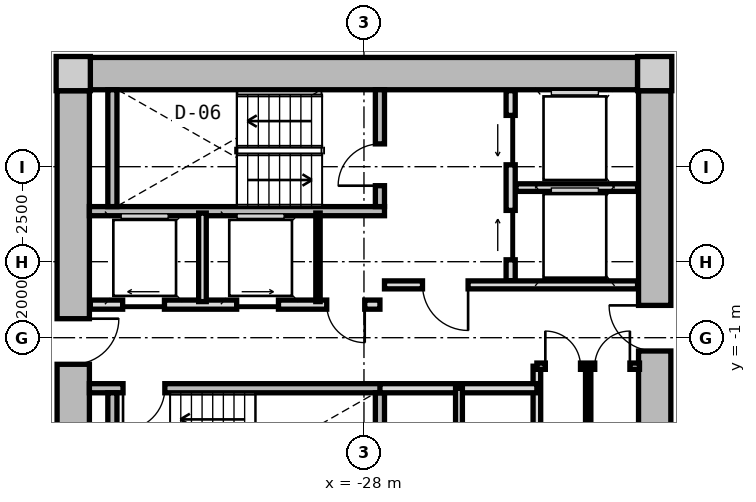
"""IFC4 building model, lengths in metres.
Left out: names, types, materials, properties, quantities, classifications, styles, units other than length and angle.
Written with IfcOpenShell. Run it as: python <this file> out.ifc"""

import sys

from ifc_helpers import new_model, si_unit, direction, frame, frame_2d, origin, origin_2d, place, context, subcontext, project, spatial, rectangle, extrude, source, transform, mapped, element, fill, save


model = new_model("IFC4")
c1 = context("Model", 3, precision=1e-05, world=origin(), true_north=direction((0.0, 1.0)))
c2 = subcontext(c1, "Body", "Model", "MODEL_VIEW")
j1 = project(units=[si_unit("LENGTHUNIT", "METRE"), si_unit("PLANEANGLEUNIT", "RADIAN")], contexts=[c1])
p1 = place(None, origin())
s1 = spatial("IfcSite", under=j1, at=p1, CompositionType="ELEMENT")
p2 = place(p1, origin())
s2 = spatial("IfcBuilding", under=s1, at=p2, CompositionType="ELEMENT")
p3 = place(p2, frame((0.0, 0.0, 30.75)))
s3 = spatial("IfcBuildingStorey", under=s2, at=p3, CompositionType="ELEMENT", Elevation=30.75)
m1 = source(origin(), c2, "Body", "SweptSolid", [
    extrude(rectangle(XDim=0.9, YDim=0.9, at=origin_2d()), origin(), (0.0, 0.0, 1.0), 3.05),
])
for number, where, z_axis, x_axis in (
    (1, (-20.35, 5.95, 0.0), (0.0, 0.0, 1.0), (1.0, 0.0, 0.0)),
    (2, (-35.65, 5.95, 0.0), (0.0, 0.0, 1.0), (1.0, 0.0, 0.0)),
):
    element("IfcColumn", number, at=place(p3, frame(where, z_axis=z_axis, x_axis=x_axis)), inside=s3, PredefinedType="COLUMN", context=c2, shape_type="MappedRepresentation", body=[
        mapped(m1, transform((0.0, 0.0, 0.0), x_axis=(1.0, 0.0, 0.0), y_axis=(0.0, 1.0, 0.0), z_axis=(0.0, 0.0, 1.0), scale=1.0)),
    ])
m2 = source(origin(), c2, "Body", "SweptSolid", [
    extrude(rectangle(XDim=14.4, YDim=0.85, at=frame_2d((7.2, 0.0))), origin(), (0.0, 0.0, 1.0), 2.79),
])
p4 = place(p3, frame((-35.2, 5.95, 0.0), z_axis=(0.0, 0.0, 1.0), x_axis=(1.0, 0.0, 0.0)))
e3 = element("IfcWall", 3, at=p4, inside=s3, PredefinedType="SHEAR", context=c2, shape_type="MappedRepresentation", body=[
    mapped(m2, transform((0.0, 0.0, 0.0), x_axis=(1.0, 0.0, 0.0), y_axis=(0.0, 1.0, 0.0), z_axis=(0.0, 0.0, 1.0), scale=1.0)),
])
m3 = source(origin(), c2, "Body", "SweptSolid", [
    extrude(rectangle(XDim=11.0, YDim=0.85, at=frame_2d((5.5, 0.0))), origin(), (0.0, 0.0, 1.0), 2.79),
])
p5 = place(p3, frame((-35.65, -5.5, 0.0), z_axis=(0.0, 0.0, 1.0), x_axis=(0.0, 1.0, 0.0)))
e4 = element("IfcWall", 4, at=p5, inside=s3, PredefinedType="SHEAR", context=c2, shape_type="MappedRepresentation", body=[
    mapped(m3, transform((0.0, 0.0, 0.0), x_axis=(1.0, 0.0, 0.0), y_axis=(0.0, 1.0, 0.0), z_axis=(0.0, 0.0, 1.0), scale=1.0)),
])
p6 = place(p5, frame((3.8, 0.0, 0.0)))
e5 = element("IfcOpeningElement", 5, at=p6, cuts=e4, PredefinedType="OPENING", context=c2, shape_type="SweptSolid", body=[
    extrude(rectangle(XDim=1.2, YDim=2.15, at=frame_2d((0.6, 1.075))), frame((0.0, 0.435, 0.0), z_axis=(0.0, -1.0, 0.0), x_axis=(1.0, 0.0, 0.0)), (0.0, 0.0, 1.0), 0.87),
])
p7 = place(p3, frame((-20.35, 5.5, 0.0), z_axis=(0.0, 0.0, 1.0), x_axis=(0.0, -1.0, 0.0)))
e6 = element("IfcWall", 6, at=p7, inside=s3, PredefinedType="SHEAR", context=c2, shape_type="MappedRepresentation", body=[
    mapped(m3, transform((0.0, 0.0, 0.0), x_axis=(1.0, 0.0, 0.0), y_axis=(0.0, 1.0, 0.0), z_axis=(0.0, 0.0, 1.0), scale=1.0)),
])
p8 = place(p7, frame((5.65, 0.0, 0.0)))
e7 = element("IfcOpeningElement", 7, at=p8, cuts=e6, PredefinedType="OPENING", context=c2, shape_type="SweptSolid", body=[
    extrude(rectangle(XDim=1.2, YDim=2.15, at=frame_2d((0.6, 1.075))), frame((0.0, 0.435, 0.0), z_axis=(0.0, -1.0, 0.0), x_axis=(1.0, 0.0, 0.0)), (0.0, 0.0, 1.0), 0.87),
])
m4 = source(origin(), c2, "Body", "SweptSolid", [
    extrude(rectangle(XDim=7.765, YDim=0.24, at=frame_2d((3.883, 0.0))), origin(), (0.0, 0.0, 1.0), 2.79),
])
p9 = place(p3, frame((-35.225, 2.33, 0.0), z_axis=(0.0, 0.0, 1.0), x_axis=(1.0, 0.0, 0.0)))
e8 = element("IfcWall", 8, at=p9, inside=s3, PredefinedType="PARTITIONING", context=c2, shape_type="MappedRepresentation", body=[
    mapped(m4, transform((0.0, 0.0, 0.0), x_axis=(1.0, 0.0, 0.0), y_axis=(0.0, 1.0, 0.0), z_axis=(0.0, 0.0, 1.0), scale=1.0)),
])
m5 = source(origin(), c2, "Body", "SweptSolid", [
    extrude(rectangle(XDim=3.075, YDim=0.24, at=frame_2d((1.538, 0.0))), origin(), (0.0, 0.0, 1.0), 2.79),
])
p10 = place(p3, frame((-34.62, 2.45, 0.0), z_axis=(0.0, 0.0, 1.0), x_axis=(0.0, 1.0, 0.0)))
e9 = element("IfcWall", 9, at=p10, inside=s3, PredefinedType="PARTITIONING", context=c2, shape_type="MappedRepresentation", body=[
    mapped(m5, transform((0.0, 0.0, 0.0), x_axis=(1.0, 0.0, 0.0), y_axis=(0.0, 1.0, 0.0), z_axis=(0.0, 0.0, 1.0), scale=1.0)),
])
p11 = place(p3, frame((-27.58, 2.45, 0.0), z_axis=(0.0, 0.0, 1.0), x_axis=(0.0, 1.0, 0.0)))
e10 = element("IfcWall", 10, at=p11, inside=s3, PredefinedType="PARTITIONING", context=c2, shape_type="MappedRepresentation", body=[
    mapped(m5, transform((0.0, 0.0, 0.0), x_axis=(1.0, 0.0, 0.0), y_axis=(0.0, 1.0, 0.0), z_axis=(0.0, 0.0, 1.0), scale=1.0)),
])
p12 = place(p11, frame((0.55, 0.0, 0.0)))
e11 = element("IfcOpeningElement", 11, at=p12, cuts=e10, PredefinedType="OPENING", context=c2, shape_type="SweptSolid", body=[
    extrude(rectangle(XDim=1.1, YDim=2.15, at=frame_2d((0.55, 1.075))), frame((0.0, 0.13, 0.0), z_axis=(0.0, -1.0, 0.0), x_axis=(1.0, 0.0, 0.0)), (0.0, 0.0, 1.0), 0.26),
])
p13 = place(p3, frame((-35.225, -2.33, 0.0), z_axis=(0.0, 0.0, 1.0), x_axis=(1.0, 0.0, 0.0)))
e12 = element("IfcWall", 12, at=p13, inside=s3, PredefinedType="PARTITIONING", context=c2, shape_type="MappedRepresentation", body=[
    mapped(m4, transform((0.0, 0.0, 0.0), x_axis=(1.0, 0.0, 0.0), y_axis=(0.0, 1.0, 0.0), z_axis=(0.0, 0.0, 1.0), scale=1.0)),
])
p14 = place(p13, frame((0.885, 0.0, 0.0)))
e13 = element("IfcOpeningElement", 13, at=p14, cuts=e12, PredefinedType="OPENING", context=c2, shape_type="SweptSolid", body=[
    extrude(rectangle(XDim=1.1, YDim=2.15, at=frame_2d((0.55, 1.075))), frame((0.0, 0.13, 0.0), z_axis=(0.0, -1.0, 0.0), x_axis=(1.0, 0.0, 0.0)), (0.0, 0.0, 1.0), 0.26),
])
for number, where, z_axis, x_axis in (
    (14, (-34.62, -5.525, 0.0), (0.0, 0.0, 1.0), (0.0, 1.0, 0.0)),
    (15, (-27.58, -5.525, 0.0), (0.0, 0.0, 1.0), (0.0, 1.0, 0.0)),
):
    element("IfcWall", number, at=place(p3, frame(where, z_axis=z_axis, x_axis=x_axis)), inside=s3, PredefinedType="PARTITIONING", context=c2, shape_type="MappedRepresentation", body=[
        mapped(m5, transform((0.0, 0.0, 0.0), x_axis=(1.0, 0.0, 0.0), y_axis=(0.0, 1.0, 0.0), z_axis=(0.0, 0.0, 1.0), scale=1.0)),
    ])
m6 = source(origin(), c2, "Body", "SweptSolid", [
    extrude(rectangle(XDim=5.0, YDim=0.24, at=frame_2d((2.5, 0.0))), origin(), (0.0, 0.0, 1.0), 2.775),
])
p15 = place(p3, frame((-24.14, 0.5, 0.0), z_axis=(0.0, 0.0, 1.0), x_axis=(0.0, 1.0, 0.0)))
e16 = element("IfcWall", 16, at=p15, inside=s3, PredefinedType="PARTITIONING", context=c2, shape_type="MappedRepresentation", body=[
    mapped(m6, transform((0.0, 0.0, 0.0), x_axis=(1.0, 0.0, 0.0), y_axis=(0.0, 1.0, 0.0), z_axis=(0.0, 0.0, 1.0), scale=1.0)),
])
p16 = place(p15, frame((3.05, 0.0, 0.0)))
e17 = element("IfcOpeningElement", 17, at=p16, cuts=e16, PredefinedType="OPENING", context=c2, shape_type="SweptSolid", body=[
    extrude(rectangle(XDim=1.3, YDim=2.2, at=frame_2d((0.65, 1.1))), frame((0.0, 0.13, 0.0), z_axis=(0.0, -1.0, 0.0), x_axis=(1.0, 0.0, 0.0)), (0.0, 0.0, 1.0), 0.26),
])
p17 = place(p15, frame((0.55, 0.0, 0.0)))
e18 = element("IfcOpeningElement", 18, at=p17, cuts=e16, PredefinedType="OPENING", context=c2, shape_type="SweptSolid", body=[
    extrude(rectangle(XDim=1.3, YDim=2.2, at=frame_2d((0.65, 1.1))), frame((0.0, 0.13, 0.0), z_axis=(0.0, -1.0, 0.0), x_axis=(1.0, 0.0, 0.0)), (0.0, 0.0, 1.0), 0.26),
])
m7 = source(origin(), c2, "Body", "SweptSolid", [
    extrude(rectangle(XDim=3.2, YDim=0.2, at=frame_2d((1.6, 0.0))), origin(), (0.0, 0.0, 1.0), 2.775),
])
p18 = place(p3, frame((-24.0, 2.95, 0.0), z_axis=(0.0, 0.0, 1.0), x_axis=(1.0, 0.0, 0.0)))
e19 = element("IfcWall", 19, at=p18, inside=s3, PredefinedType="PARTITIONING", context=c2, shape_type="MappedRepresentation", body=[
    mapped(m7, transform((0.0, 0.0, 0.0), x_axis=(1.0, 0.0, 0.0), y_axis=(0.0, 1.0, 0.0), z_axis=(0.0, 0.0, 1.0), scale=1.0)),
])
m8 = source(origin(), c2, "Body", "SweptSolid", [
    extrude(rectangle(XDim=6.66, YDim=0.21, at=frame_2d((3.33, 0.0))), origin(), (0.0, 0.0, 1.0), 2.775),
])
p19 = place(p3, frame((-27.46, 0.39, 0.0), z_axis=(0.0, 0.0, 1.0), x_axis=(1.0, 0.0, 0.0)))
e20 = element("IfcWall", 20, at=p19, inside=s3, PredefinedType="PARTITIONING", context=c2, shape_type="MappedRepresentation", body=[
    mapped(m8, transform((0.0, 0.0, 0.0), x_axis=(1.0, 0.0, 0.0), y_axis=(0.0, 1.0, 0.0), z_axis=(0.0, 0.0, 1.0), scale=1.0)),
])
p20 = place(p19, frame((1.0, 0.0, 0.0)))
e21 = element("IfcOpeningElement", 21, at=p20, cuts=e20, PredefinedType="OPENING", context=c2, shape_type="SweptSolid", body=[
    extrude(rectangle(XDim=1.2, YDim=2.15, at=frame_2d((0.6, 1.075))), frame((0.0, 0.115, 0.0), z_axis=(0.0, -1.0, 0.0), x_axis=(1.0, 0.0, 0.0)), (0.0, 0.0, 1.0), 0.23),
])
m9 = source(origin(), c2, "Body", "SweptSolid", [
    extrude(rectangle(XDim=7.62, YDim=0.24, at=frame_2d((3.81, 0.0))), origin(), (0.0, 0.0, 1.0), 2.775),
])
p21 = place(p3, frame((-35.2, -0.13, 0.0), z_axis=(0.0, 0.0, 1.0), x_axis=(1.0, 0.0, 0.0)))
e22 = element("IfcWall", 22, at=p21, inside=s3, PredefinedType="PARTITIONING", context=c2, shape_type="MappedRepresentation", body=[
    mapped(m9, transform((0.0, 0.0, 0.0), x_axis=(1.0, 0.0, 0.0), y_axis=(0.0, 1.0, 0.0), z_axis=(0.0, 0.0, 1.0), scale=1.0)),
])
p22 = place(p21, frame((6.22, 0.0, 0.0)))
e23 = element("IfcOpeningElement", 23, at=p22, cuts=e22, PredefinedType="OPENING", context=c2, shape_type="SweptSolid", body=[
    extrude(rectangle(XDim=1.0, YDim=2.1, at=frame_2d((0.5, 1.05))), frame((0.0, 0.13, 0.0), z_axis=(0.0, -1.0, 0.0), x_axis=(1.0, 0.0, 0.0)), (0.0, 0.0, 1.0), 0.26),
])
p23 = place(p21, frame((0.85, 0.0, 0.0)))
e24 = element("IfcOpeningElement", 24, at=p23, cuts=e22, PredefinedType="OPENING", context=c2, shape_type="SweptSolid", body=[
    extrude(rectangle(XDim=1.1, YDim=2.2, at=frame_2d((0.55, 1.1))), frame((0.0, 0.13, 0.0), z_axis=(0.0, -1.0, 0.0), x_axis=(1.0, 0.0, 0.0)), (0.0, 0.0, 1.0), 0.26),
])
p24 = place(p21, frame((3.85, 0.0, 0.0)))
e25 = element("IfcOpeningElement", 25, at=p24, cuts=e22, PredefinedType="OPENING", context=c2, shape_type="SweptSolid", body=[
    extrude(rectangle(XDim=1.1, YDim=2.2, at=frame_2d((0.55, 1.1))), frame((0.0, 0.13, 0.0), z_axis=(0.0, -1.0, 0.0), x_axis=(1.0, 0.0, 0.0)), (0.0, 0.0, 1.0), 0.26),
])
m10 = source(origin(), c2, "Body", "SweptSolid", [
    extrude(rectangle(XDim=2.33, YDim=0.115, at=frame_2d((1.165, 0.0))), origin(), (0.0, 0.0, 1.0), 2.775),
])
p25 = place(p3, frame((-29.21, -0.05, 0.0), z_axis=(0.0, 0.0, 1.0), x_axis=(0.0, 1.0, 0.0)))
e26 = element("IfcWall", 26, at=p25, inside=s3, PredefinedType="PARTITIONING", context=c2, shape_type="MappedRepresentation", body=[
    mapped(m10, transform((0.0, 0.0, 0.0), x_axis=(1.0, 0.0, 0.0), y_axis=(0.0, 1.0, 0.0), z_axis=(0.0, 0.0, 1.0), scale=1.0)),
])
m11 = source(origin(), c2, "Body", "SweptSolid", [
    extrude(rectangle(XDim=2.33, YDim=0.2, at=frame_2d((1.165, 0.0))), origin(), (0.0, 0.0, 1.0), 2.775),
])
p26 = place(p3, frame((-32.25, -0.05, 0.0), z_axis=(0.0, 0.0, 1.0), x_axis=(0.0, 1.0, 0.0)))
e27 = element("IfcWall", 27, at=p26, inside=s3, PredefinedType="PARTITIONING", context=c2, shape_type="MappedRepresentation", body=[
    mapped(m11, transform((0.0, 0.0, 0.0), x_axis=(1.0, 0.0, 0.0), y_axis=(0.0, 1.0, 0.0), z_axis=(0.0, 0.0, 1.0), scale=1.0)),
])
m12 = source(origin(), c2, "Body", "SweptSolid", [
    extrude(rectangle(XDim=3.8, YDim=0.2, at=frame_2d((1.9, 0.0))), origin(), (0.0, 0.0, 1.0), 2.775),
])
p27 = place(p3, frame((-23.45, -5.55, 0.0), z_axis=(0.0, 0.0, 1.0), x_axis=(0.0, 1.0, 0.0)))
e28 = element("IfcWall", 28, at=p27, inside=s3, PredefinedType="PARTITIONING", context=c2, shape_type="MappedRepresentation", body=[
    mapped(m12, transform((0.0, 0.0, 0.0), x_axis=(1.0, 0.0, 0.0), y_axis=(0.0, 1.0, 0.0), z_axis=(0.0, 0.0, 1.0), scale=1.0)),
])
m13 = source(origin(), c2, "Body", "SweptSolid", [
    extrude(rectangle(XDim=4.13, YDim=0.24, at=frame_2d((2.065, 0.0))), origin(), (0.0, 0.0, 1.0), 2.775),
])
p28 = place(p3, frame((-27.58, -2.33, 0.0), z_axis=(0.0, 0.0, 1.0), x_axis=(1.0, 0.0, 0.0)))
e29 = element("IfcWall", 29, at=p28, inside=s3, PredefinedType="PARTITIONING", context=c2, shape_type="MappedRepresentation", body=[
    mapped(m13, transform((0.0, 0.0, 0.0), x_axis=(1.0, 0.0, 0.0), y_axis=(0.0, 1.0, 0.0), z_axis=(0.0, 0.0, 1.0), scale=1.0)),
])
m14 = source(origin(), c2, "Body", "SweptSolid", [
    extrude(rectangle(XDim=3.22, YDim=0.18, at=frame_2d((1.61, 0.0))), origin(), (0.0, 0.0, 1.0), 2.775),
])
p29 = place(p3, frame((-25.5, -5.55, 0.0), z_axis=(0.0, 0.0, 1.0), x_axis=(0.0, 1.0, 0.0)))
e30 = element("IfcWall", 30, at=p29, inside=s3, PredefinedType="PARTITIONING", context=c2, shape_type="MappedRepresentation", body=[
    mapped(m14, transform((0.0, 0.0, 0.0), x_axis=(1.0, 0.0, 0.0), y_axis=(0.0, 1.0, 0.0), z_axis=(0.0, 0.0, 1.0), scale=1.0)),
])
m15 = source(origin(), c2, "Body", "SweptSolid", [
    extrude(rectangle(XDim=2.7, YDim=0.165, at=frame_2d((1.35, 0.0))), origin(), (0.0, 0.0, 1.0), 2.775),
])
p30 = place(p3, frame((-23.45, -1.75, 0.0), z_axis=(0.0, 0.0, 1.0), x_axis=(1.0, 0.0, 0.0)))
e31 = element("IfcWall", 31, at=p30, inside=s3, PredefinedType="PARTITIONING", context=c2, shape_type="MappedRepresentation", body=[
    mapped(m15, transform((0.0, 0.0, 0.0), x_axis=(1.0, 0.0, 0.0), y_axis=(0.0, 1.0, 0.0), z_axis=(0.0, 0.0, 1.0), scale=1.0)),
])
p31 = place(p30, frame((0.222, 0.0, 0.0)))
e32 = element("IfcOpeningElement", 32, at=p31, cuts=e31, PredefinedType="OPENING", context=c2, shape_type="SweptSolid", body=[
    extrude(rectangle(XDim=0.925, YDim=2.1, at=frame_2d((0.462, 1.05))), frame((0.0, 0.093, 0.0), z_axis=(0.0, -1.0, 0.0), x_axis=(1.0, 0.0, 0.0)), (0.0, 0.0, 1.0), 0.185),
])
p32 = place(p30, frame((1.522, 0.0, 0.0)))
e33 = element("IfcOpeningElement", 33, at=p32, cuts=e31, PredefinedType="OPENING", context=c2, shape_type="SweptSolid", body=[
    extrude(rectangle(XDim=0.925, YDim=2.1, at=frame_2d((0.462, 1.05))), frame((0.0, 0.093, 0.0), z_axis=(0.0, -1.0, 0.0), x_axis=(1.0, 0.0, 0.0)), (0.0, 0.0, 1.0), 0.185),
])
m16 = source(origin(), c2, "Body", "SweptSolid", [
    extrude(rectangle(XDim=3.8, YDim=0.14, at=frame_2d((1.9, 0.0))), origin(), (0.0, 0.0, 1.0), 2.775),
])
p33 = place(p3, frame((-22.1, -5.55, 0.0), z_axis=(0.0, 0.0, 1.0), x_axis=(0.0, 1.0, 0.0)))
e34 = element("IfcWall", 34, at=p33, inside=s3, PredefinedType="PARTITIONING", context=c2, shape_type="MappedRepresentation", body=[
    mapped(m16, transform((0.0, 0.0, 0.0), x_axis=(1.0, 0.0, 0.0), y_axis=(0.0, 1.0, 0.0), z_axis=(0.0, 0.0, 1.0), scale=1.0)),
])
m17 = source(origin(), c2, "Body", "SweptSolid", [
    extrude(rectangle(XDim=1.1, YDim=2.15, at=frame_2d((0.55, 1.075))), frame((0.0, 0.025, 0.0), z_axis=(0.0, -1.0, 0.0), x_axis=(1.0, 0.0, 0.0)), (0.0, 0.0, 1.0), 0.05),
])
p34 = place(p12, origin())
e35 = element("IfcDoor", 35, at=p34, inside=s3, OperationType="SINGLE_SWING_LEFT", PredefinedType="DOOR", context=c2, shape_type="MappedRepresentation", body=[
    mapped(m17, transform((0.0, 0.0, 0.0), x_axis=(1.0, 0.0, 0.0), y_axis=(0.0, 1.0, 0.0), z_axis=(0.0, 0.0, 1.0), scale=1.0)),
])
fill(e11, e35)
p35 = place(p14, frame((1.1, 0.0, 0.0), z_axis=(0.0, 0.0, 1.0), x_axis=(-1.0, 0.0, 0.0)))
e36 = element("IfcDoor", 36, at=p35, inside=s3, OperationType="SINGLE_SWING_RIGHT", PredefinedType="DOOR", context=c2, shape_type="MappedRepresentation", body=[
    mapped(m17, transform((0.0, 0.0, 0.0), x_axis=(1.0, 0.0, 0.0), y_axis=(0.0, 1.0, 0.0), z_axis=(0.0, 0.0, 1.0), scale=1.0)),
])
fill(e13, e36)
m18 = source(origin(), c2, "Body", "SweptSolid", [
    extrude(rectangle(XDim=1.3, YDim=2.2, at=frame_2d((0.65, 1.1))), frame((0.0, 0.025, 0.0), z_axis=(0.0, -1.0, 0.0), x_axis=(1.0, 0.0, 0.0)), (0.0, 0.0, 1.0), 0.05),
])
p36 = place(p16, origin())
e37 = element("IfcDoor", 37, at=p36, inside=s3, OperationType="SLIDING_TO_LEFT", PredefinedType="DOOR", context=c2, shape_type="MappedRepresentation", body=[
    mapped(m18, transform((0.0, 0.0, 0.0), x_axis=(1.0, 0.0, 0.0), y_axis=(0.0, 1.0, 0.0), z_axis=(0.0, 0.0, 1.0), scale=1.0)),
])
fill(e17, e37)
p37 = place(p17, origin())
e38 = element("IfcDoor", 38, at=p37, inside=s3, OperationType="SLIDING_TO_RIGHT", PredefinedType="DOOR", context=c2, shape_type="MappedRepresentation", body=[
    mapped(m18, transform((0.0, 0.0, 0.0), x_axis=(1.0, 0.0, 0.0), y_axis=(0.0, 1.0, 0.0), z_axis=(0.0, 0.0, 1.0), scale=1.0)),
])
fill(e18, e38)
m19 = source(origin(), c2, "Body", "SweptSolid", [
    extrude(rectangle(XDim=1.2, YDim=2.15, at=frame_2d((0.6, 1.075))), frame((0.0, 0.025, 0.0), z_axis=(0.0, -1.0, 0.0), x_axis=(1.0, 0.0, 0.0)), (0.0, 0.0, 1.0), 0.05),
])
p38 = place(p20, frame((1.2, 0.0, 0.0), z_axis=(0.0, 0.0, 1.0), x_axis=(-1.0, 0.0, 0.0)))
e39 = element("IfcDoor", 39, at=p38, inside=s3, OperationType="SINGLE_SWING_LEFT", PredefinedType="DOOR", context=c2, shape_type="MappedRepresentation", body=[
    mapped(m19, transform((0.0, 0.0, 0.0), x_axis=(1.0, 0.0, 0.0), y_axis=(0.0, 1.0, 0.0), z_axis=(0.0, 0.0, 1.0), scale=1.0)),
])
fill(e21, e39)
p39 = place(p6, frame((1.2, 0.0, 0.0), z_axis=(0.0, 0.0, 1.0), x_axis=(-1.0, 0.0, 0.0)))
e40 = element("IfcDoor", 40, at=p39, inside=s3, OperationType="SINGLE_SWING_LEFT", PredefinedType="DOOR", context=c2, shape_type="MappedRepresentation", body=[
    mapped(m19, transform((0.0, 0.0, 0.0), x_axis=(1.0, 0.0, 0.0), y_axis=(0.0, 1.0, 0.0), z_axis=(0.0, 0.0, 1.0), scale=1.0)),
])
fill(e5, e40)
p40 = place(p8, frame((1.2, 0.0, 0.0), z_axis=(0.0, 0.0, 1.0), x_axis=(-1.0, 0.0, 0.0)))
e41 = element("IfcDoor", 41, at=p40, inside=s3, OperationType="SINGLE_SWING_RIGHT", PredefinedType="DOOR", context=c2, shape_type="MappedRepresentation", body=[
    mapped(m19, transform((0.0, 0.0, 0.0), x_axis=(1.0, 0.0, 0.0), y_axis=(0.0, 1.0, 0.0), z_axis=(0.0, 0.0, 1.0), scale=1.0)),
])
fill(e7, e41)
m20 = source(origin(), c2, "Body", "SweptSolid", [
    extrude(rectangle(XDim=1.0, YDim=2.1, at=frame_2d((0.5, 1.05))), frame((0.0, 0.025, 0.0), z_axis=(0.0, -1.0, 0.0), x_axis=(1.0, 0.0, 0.0)), (0.0, 0.0, 1.0), 0.05),
])
p41 = place(p22, frame((1.0, 0.0, 0.0), z_axis=(0.0, 0.0, 1.0), x_axis=(-1.0, 0.0, 0.0)))
e42 = element("IfcDoor", 42, at=p41, inside=s3, OperationType="SINGLE_SWING_LEFT", PredefinedType="DOOR", context=c2, shape_type="MappedRepresentation", body=[
    mapped(m20, transform((0.0, 0.0, 0.0), x_axis=(1.0, 0.0, 0.0), y_axis=(0.0, 1.0, 0.0), z_axis=(0.0, 0.0, 1.0), scale=1.0)),
])
fill(e23, e42)
m21 = source(origin(), c2, "Body", "SweptSolid", [
    extrude(rectangle(XDim=1.1, YDim=2.2, at=frame_2d((0.55, 1.1))), frame((0.0, 0.025, 0.0), z_axis=(0.0, -1.0, 0.0), x_axis=(1.0, 0.0, 0.0)), (0.0, 0.0, 1.0), 0.05),
])
p42 = place(p23, origin())
e43 = element("IfcDoor", 43, at=p42, inside=s3, OperationType="SLIDING_TO_LEFT", PredefinedType="DOOR", context=c2, shape_type="MappedRepresentation", body=[
    mapped(m21, transform((0.0, 0.0, 0.0), x_axis=(1.0, 0.0, 0.0), y_axis=(0.0, 1.0, 0.0), z_axis=(0.0, 0.0, 1.0), scale=1.0)),
])
fill(e24, e43)
p43 = place(p24, origin())
e44 = element("IfcDoor", 44, at=p43, inside=s3, OperationType="SLIDING_TO_RIGHT", PredefinedType="DOOR", context=c2, shape_type="MappedRepresentation", body=[
    mapped(m21, transform((0.0, 0.0, 0.0), x_axis=(1.0, 0.0, 0.0), y_axis=(0.0, 1.0, 0.0), z_axis=(0.0, 0.0, 1.0), scale=1.0)),
])
fill(e25, e44)
m22 = source(origin(), c2, "Body", "SweptSolid", [
    extrude(rectangle(XDim=0.925, YDim=2.1, at=frame_2d((0.462, 1.05))), frame((0.0, 0.025, 0.0), z_axis=(0.0, -1.0, 0.0), x_axis=(1.0, 0.0, 0.0)), (0.0, 0.0, 1.0), 0.05),
])
p44 = place(p31, origin())
e45 = element("IfcDoor", 45, at=p44, inside=s3, OperationType="SINGLE_SWING_LEFT", PredefinedType="DOOR", context=c2, shape_type="MappedRepresentation", body=[
    mapped(m22, transform((0.0, 0.0, 0.0), x_axis=(1.0, 0.0, 0.0), y_axis=(0.0, 1.0, 0.0), z_axis=(0.0, 0.0, 1.0), scale=1.0)),
])
fill(e32, e45)
p45 = place(p32, origin())
e46 = element("IfcDoor", 46, at=p45, inside=s3, OperationType="SINGLE_SWING_RIGHT", PredefinedType="DOOR", context=c2, shape_type="MappedRepresentation", body=[
    mapped(m22, transform((0.0, 0.0, 0.0), x_axis=(1.0, 0.0, 0.0), y_axis=(0.0, 1.0, 0.0), z_axis=(0.0, 0.0, 1.0), scale=1.0)),
])
fill(e33, e46)
save(model, sys.argv[1])
